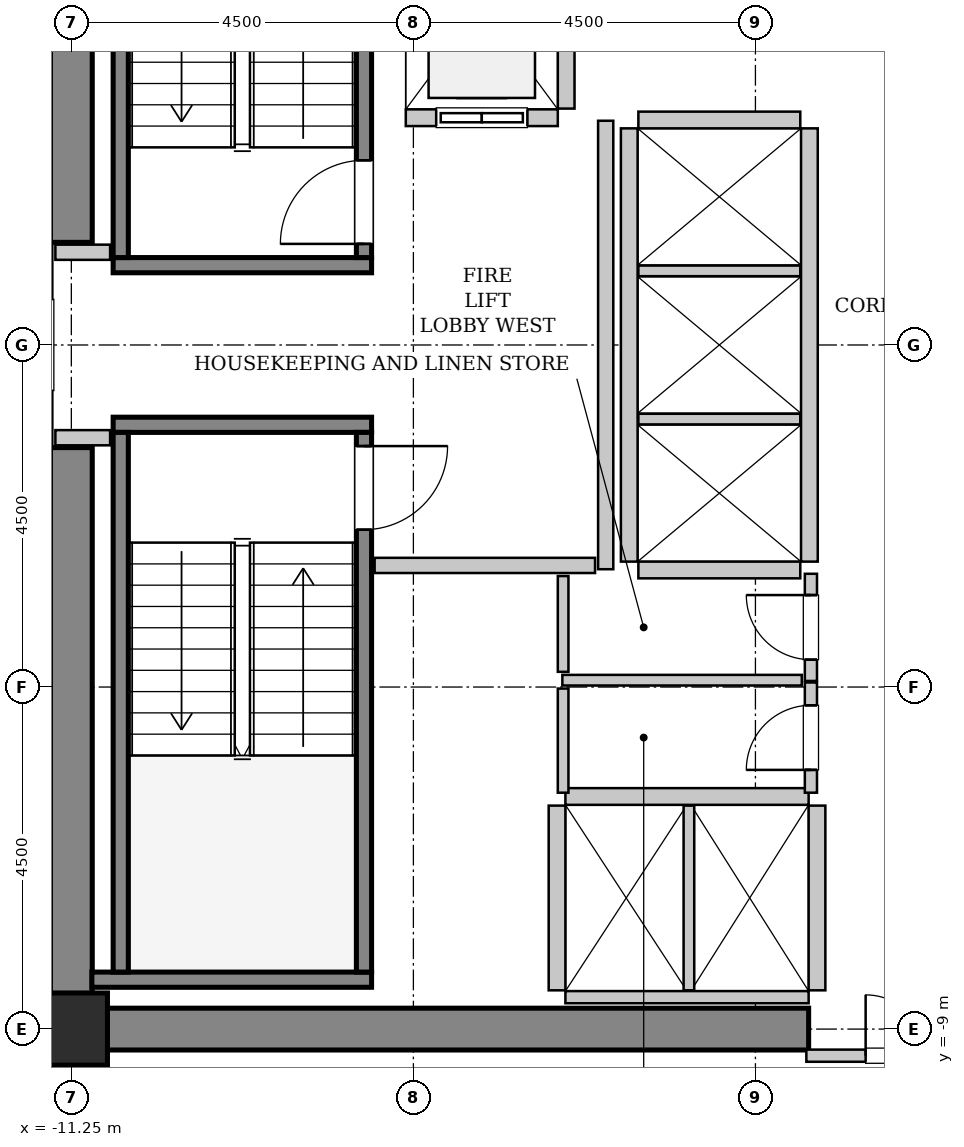
"""IFC4 building model, lengths in metres.
Left out: names, types, materials, properties, quantities, classifications, styles, units other than length and angle.
Written with IfcOpenShell. Run it as: python <this file> out.ifc"""

import sys

from ifc_helpers import new_model, si_unit, direction, frame, frame_2d, origin, origin_2d, place, context, subcontext, project, spatial, rectangle, hollow_rectangle, extrude, source, transform, mapped, element, fill, save


model = new_model("IFC4")
c1 = context("Model", 3, precision=1e-05, world=origin(), true_north=direction((0.0, 1.0)))
c2 = subcontext(c1, "Body", "Model", "MODEL_VIEW")
j1 = project(units=[si_unit("LENGTHUNIT", "METRE"), si_unit("PLANEANGLEUNIT", "RADIAN")], contexts=[c1])
p1 = place(None, origin())
s1 = spatial("IfcSite", under=j1, at=p1, CompositionType="ELEMENT")
p2 = place(p1, origin())
s2 = spatial("IfcBuilding", under=s1, at=p2, CompositionType="ELEMENT")
p3 = place(p2, frame((0.0, 0.0, 136.4)))
s3 = spatial("IfcBuildingStorey", under=s2, at=p3, CompositionType="ELEMENT", Elevation=136.4)
m1 = source(origin(), c2, "Body", "SweptSolid", [
    extrude(rectangle(XDim=9.975, YDim=0.55, at=frame_2d((4.987, 0.0))), origin(), (0.0, 0.0, 1.0), 3.8),
])
p4 = place(p3, frame((-11.525, -9.0, 0.0), z_axis=(0.0, 0.0, 1.0), x_axis=(1.0, 0.0, 0.0)))
e1 = element("IfcWall", 1, at=p4, inside=s3, PredefinedType="SHEAR", context=c2, shape_type="MappedRepresentation", body=[
    mapped(m1, transform((0.0, 0.0, 0.0), x_axis=(1.0, 0.0, 0.0), y_axis=(0.0, 1.0, 0.0), z_axis=(0.0, 0.0, 1.0), scale=1.0)),
])
m2 = source(origin(), c2, "Body", "SweptSolid", [
    extrude(rectangle(XDim=7.375, YDim=0.55, at=frame_2d((3.688, 0.0))), origin(), (0.0, 0.0, 1.0), 3.8),
])
for number, where, z_axis, x_axis in (
    (2, (-11.25, -8.725, 0.0), (0.0, 0.0, 1.0), (0.0, 1.0, 0.0)),
    (3, (-11.25, 1.35, 0.0), (0.0, 0.0, 1.0), (0.0, 1.0, 0.0)),
):
    element("IfcWall", number, at=place(p3, frame(where, z_axis=z_axis, x_axis=x_axis)), inside=s3, PredefinedType="SHEAR", context=c2, shape_type="MappedRepresentation", body=[
        mapped(m2, transform((0.0, 0.0, 0.0), x_axis=(1.0, 0.0, 0.0), y_axis=(0.0, 1.0, 0.0), z_axis=(0.0, 0.0, 1.0), scale=1.0)),
    ])
m3 = source(origin(), c2, "Body", "SweptSolid", [
    extrude(hollow_rectangle(XDim=0.95, YDim=0.95, WallThickness=0.045, InnerFilletRadius=0.045, OuterFilletRadius=0.09, at=origin_2d()), origin(), (0.0, 0.0, 1.0), 3.8),
])
p5 = place(p3, frame((-11.25, -9.0, 0.0), z_axis=(0.0, 0.0, 1.0), x_axis=(1.0, 0.0, 0.0)))
e4 = element("IfcColumn", 4, at=p5, inside=s3, PredefinedType="COLUMN", context=c2, shape_type="MappedRepresentation", body=[
    mapped(m3, transform((0.0, 0.0, 0.0), x_axis=(1.0, 0.0, 0.0), y_axis=(0.0, 1.0, 0.0), z_axis=(0.0, 0.0, 1.0), scale=1.0)),
])
m4 = source(origin(), c2, "Body", "SweptSolid", [
    extrude(rectangle(XDim=3.4, YDim=0.2, at=frame_2d((1.7, 0.0))), origin(), (0.0, 0.0, 1.0), 3.8),
])
p6 = place(p3, frame((-7.3, 1.05, 0.0), z_axis=(0.0, 0.0, 1.0), x_axis=(-1.0, 0.0, 0.0)))
e5 = element("IfcWall", 5, at=p6, inside=s3, PredefinedType="SOLIDWALL", context=c2, shape_type="MappedRepresentation", body=[
    mapped(m4, transform((0.0, 0.0, 0.0), x_axis=(1.0, 0.0, 0.0), y_axis=(0.0, 1.0, 0.0), z_axis=(0.0, 0.0, 1.0), scale=1.0)),
])
m5 = source(origin(), c2, "Body", "SweptSolid", [
    extrude(rectangle(XDim=7.1, YDim=0.2, at=frame_2d((3.55, 0.0))), origin(), (0.0, 0.0, 1.0), 3.8),
])
p7 = place(p3, frame((-7.4, 1.15, 0.0), z_axis=(0.0, 0.0, 1.0), x_axis=(0.0, 1.0, 0.0)))
e6 = element("IfcWall", 6, at=p7, inside=s3, PredefinedType="SOLIDWALL", context=c2, shape_type="MappedRepresentation", body=[
    mapped(m5, transform((0.0, 0.0, 0.0), x_axis=(1.0, 0.0, 0.0), y_axis=(0.0, 1.0, 0.0), z_axis=(0.0, 0.0, 1.0), scale=1.0)),
])
p8 = place(p7, frame((0.18, 0.0, 0.0)))
e7 = element("IfcOpeningElement", 7, at=p8, cuts=e6, PredefinedType="OPENING", context=c2, shape_type="SweptSolid", body=[
    extrude(rectangle(XDim=1.1, YDim=2.15, at=frame_2d((0.55, 1.075))), frame((0.0, 0.11, 0.0), z_axis=(0.0, -1.0, 0.0), x_axis=(1.0, 0.0, 0.0)), (0.0, 0.0, 1.0), 0.22),
])
p9 = place(p3, frame((-10.6, 1.15, 0.0), z_axis=(0.0, 0.0, 1.0), x_axis=(0.0, 1.0, 0.0)))
e8 = element("IfcWall", 8, at=p9, inside=s3, PredefinedType="SOLIDWALL", context=c2, shape_type="MappedRepresentation", body=[
    mapped(m5, transform((0.0, 0.0, 0.0), x_axis=(1.0, 0.0, 0.0), y_axis=(0.0, 1.0, 0.0), z_axis=(0.0, 0.0, 1.0), scale=1.0)),
])
p10 = place(p3, frame((-10.7, -1.05, 0.0), z_axis=(0.0, 0.0, 1.0), x_axis=(1.0, 0.0, 0.0)))
e9 = element("IfcWall", 9, at=p10, inside=s3, PredefinedType="SOLIDWALL", context=c2, shape_type="MappedRepresentation", body=[
    mapped(m4, transform((0.0, 0.0, 0.0), x_axis=(1.0, 0.0, 0.0), y_axis=(0.0, 1.0, 0.0), z_axis=(0.0, 0.0, 1.0), scale=1.0)),
])
m6 = source(origin(), c2, "Body", "SweptSolid", [
    extrude(rectangle(XDim=3.68, YDim=0.2, at=frame_2d((1.84, 0.0))), origin(), (0.0, 0.0, 1.0), 3.8),
])
p11 = place(p3, frame((-10.98, -8.35, 0.0), z_axis=(0.0, 0.0, 1.0), x_axis=(1.0, 0.0, 0.0)))
e10 = element("IfcWall", 10, at=p11, inside=s3, PredefinedType="SOLIDWALL", context=c2, shape_type="MappedRepresentation", body=[
    mapped(m6, transform((0.0, 0.0, 0.0), x_axis=(1.0, 0.0, 0.0), y_axis=(0.0, 1.0, 0.0), z_axis=(0.0, 0.0, 1.0), scale=1.0)),
])
p12 = place(p3, frame((-10.6, -1.15, 0.0), z_axis=(0.0, 0.0, 1.0), x_axis=(0.0, -1.0, 0.0)))
e11 = element("IfcWall", 11, at=p12, inside=s3, PredefinedType="SOLIDWALL", context=c2, shape_type="MappedRepresentation", body=[
    mapped(m5, transform((0.0, 0.0, 0.0), x_axis=(1.0, 0.0, 0.0), y_axis=(0.0, 1.0, 0.0), z_axis=(0.0, 0.0, 1.0), scale=1.0)),
])
p13 = place(p3, frame((-7.4, -1.15, 0.0), z_axis=(0.0, 0.0, 1.0), x_axis=(0.0, -1.0, 0.0)))
e12 = element("IfcWall", 12, at=p13, inside=s3, PredefinedType="SOLIDWALL", context=c2, shape_type="MappedRepresentation", body=[
    mapped(m5, transform((0.0, 0.0, 0.0), x_axis=(1.0, 0.0, 0.0), y_axis=(0.0, 1.0, 0.0), z_axis=(0.0, 0.0, 1.0), scale=1.0)),
])
p14 = place(p13, frame((0.18, 0.0, 0.0)))
e13 = element("IfcOpeningElement", 13, at=p14, cuts=e12, PredefinedType="OPENING", context=c2, shape_type="SweptSolid", body=[
    extrude(rectangle(XDim=1.1, YDim=2.15, at=frame_2d((0.55, 1.075))), frame((0.0, 0.11, 0.0), z_axis=(0.0, -1.0, 0.0), x_axis=(1.0, 0.0, 0.0)), (0.0, 0.0, 1.0), 0.22),
])
m7 = source(origin(), c2, "Body", "SweptSolid", [
    extrude(rectangle(XDim=2.0, YDim=0.22, at=frame_2d((1.0, 0.0))), origin(), (0.0, 0.0, 1.0), 3.535),
])
p15 = place(p3, frame((-6.85, 2.99, 0.0), z_axis=(0.0, 0.0, 1.0), x_axis=(1.0, 0.0, 0.0)))
e14 = element("IfcWall", 14, at=p15, inside=s3, PredefinedType="SOLIDWALL", context=c2, shape_type="MappedRepresentation", body=[
    mapped(m7, transform((0.0, 0.0, 0.0), x_axis=(1.0, 0.0, 0.0), y_axis=(0.0, 1.0, 0.0), z_axis=(0.0, 0.0, 1.0), scale=1.0)),
])
p16 = place(p15, frame((0.4, 0.0, 0.0)))
e15 = element("IfcOpeningElement", 15, at=p16, cuts=e14, PredefinedType="OPENING", context=c2, shape_type="SweptSolid", body=[
    extrude(rectangle(XDim=1.2, YDim=2.2, at=frame_2d((0.6, 1.1))), frame((0.0, 0.12, 0.0), z_axis=(0.0, -1.0, 0.0), x_axis=(1.0, 0.0, 0.0)), (0.0, 0.0, 1.0), 0.24),
])
m8 = source(origin(), c2, "Body", "SweptSolid", [
    extrude(rectangle(XDim=2.68, YDim=0.22, at=frame_2d((1.34, 0.0))), origin(), (0.0, 0.0, 1.0), 3.535),
])
p17 = place(p3, frame((-4.74, 3.11, 0.0), z_axis=(0.0, 0.0, 1.0), x_axis=(0.0, 1.0, 0.0)))
e16 = element("IfcWall", 16, at=p17, inside=s3, PredefinedType="SOLIDWALL", context=c2, shape_type="MappedRepresentation", body=[
    mapped(m8, transform((0.0, 0.0, 0.0), x_axis=(1.0, 0.0, 0.0), y_axis=(0.0, 1.0, 0.0), z_axis=(0.0, 0.0, 1.0), scale=1.0)),
])
m9 = source(origin(), c2, "Body", "SweptSolid", [
    extrude(rectangle(XDim=3.2, YDim=0.22, at=frame_2d((1.6, 0.0))), origin(), (0.0, 0.0, 1.0), 3.535),
])
p18 = place(p3, frame((-1.55, -5.94, 0.0), z_axis=(0.0, 0.0, 1.0), x_axis=(-1.0, 0.0, 0.0)))
e17 = element("IfcWall", 17, at=p18, inside=s3, PredefinedType="SOLIDWALL", context=c2, shape_type="MappedRepresentation", body=[
    mapped(m9, transform((0.0, 0.0, 0.0), x_axis=(1.0, 0.0, 0.0), y_axis=(0.0, 1.0, 0.0), z_axis=(0.0, 0.0, 1.0), scale=1.0)),
])
m10 = source(origin(), c2, "Body", "SweptSolid", [
    extrude(rectangle(XDim=3.2, YDim=0.16, at=frame_2d((1.6, 0.0))), origin(), (0.0, 0.0, 1.0), 2.425),
])
p19 = place(p3, frame((-4.75, -8.58, 0.0), z_axis=(0.0, 0.0, 1.0), x_axis=(1.0, 0.0, 0.0)))
e18 = element("IfcWall", 18, at=p19, inside=s3, PredefinedType="PARTITIONING", context=c2, shape_type="MappedRepresentation", body=[
    mapped(m10, transform((0.0, 0.0, 0.0), x_axis=(1.0, 0.0, 0.0), y_axis=(0.0, 1.0, 0.0), z_axis=(0.0, 0.0, 1.0), scale=1.0)),
])
m11 = source(origin(), c2, "Body", "SweptSolid", [
    extrude(rectangle(XDim=2.43, YDim=0.22, at=frame_2d((1.215, 0.0))), origin(), (0.0, 0.0, 1.0), 3.535),
])
p20 = place(p3, frame((-4.86, -6.06, 0.0), z_axis=(0.0, 0.0, 1.0), x_axis=(0.0, -1.0, 0.0)))
e19 = element("IfcWall", 19, at=p20, inside=s3, PredefinedType="SOLIDWALL", context=c2, shape_type="MappedRepresentation", body=[
    mapped(m11, transform((0.0, 0.0, 0.0), x_axis=(1.0, 0.0, 0.0), y_axis=(0.0, 1.0, 0.0), z_axis=(0.0, 0.0, 1.0), scale=1.0)),
])
m12 = source(origin(), c2, "Body", "SweptSolid", [
    extrude(rectangle(XDim=2.43, YDim=0.14, at=frame_2d((1.215, 0.0))), origin(), (0.0, 0.0, 1.0), 3.535),
])
p21 = place(p3, frame((-3.125, -8.49, 0.0), z_axis=(0.0, 0.0, 1.0), x_axis=(0.0, 1.0, 0.0)))
e20 = element("IfcWall", 20, at=p21, inside=s3, PredefinedType="PARTITIONING", context=c2, shape_type="MappedRepresentation", body=[
    mapped(m12, transform((0.0, 0.0, 0.0), x_axis=(1.0, 0.0, 0.0), y_axis=(0.0, 1.0, 0.0), z_axis=(0.0, 0.0, 1.0), scale=1.0)),
])
p22 = place(p3, frame((-1.44, -8.49, 0.0), z_axis=(0.0, 0.0, 1.0), x_axis=(0.0, 1.0, 0.0)))
e21 = element("IfcWall", 21, at=p22, inside=s3, PredefinedType="SOLIDWALL", context=c2, shape_type="MappedRepresentation", body=[
    mapped(m11, transform((0.0, 0.0, 0.0), x_axis=(1.0, 0.0, 0.0), y_axis=(0.0, 1.0, 0.0), z_axis=(0.0, 0.0, 1.0), scale=1.0)),
])
m13 = source(origin(), c2, "Body", "SweptSolid", [
    extrude(rectangle(XDim=5.7, YDim=0.22, at=frame_2d((2.85, 0.0))), origin(), (0.0, 0.0, 1.0), 3.535),
])
for number, where, z_axis, x_axis in (
    (22, (-1.54, -2.85, 0.0), (0.0, 0.0, 1.0), (0.0, 1.0, 0.0)),
    (23, (-3.91, 2.85, 0.0), (0.0, 0.0, 1.0), (0.0, -1.0, 0.0)),
):
    element("IfcWall", number, at=place(p3, frame(where, z_axis=z_axis, x_axis=x_axis)), inside=s3, PredefinedType="SOLIDWALL", context=c2, shape_type="MappedRepresentation", body=[
        mapped(m13, transform((0.0, 0.0, 0.0), x_axis=(1.0, 0.0, 0.0), y_axis=(0.0, 1.0, 0.0), z_axis=(0.0, 0.0, 1.0), scale=1.0)),
    ])
m14 = source(origin(), c2, "Body", "SweptSolid", [
    extrude(rectangle(XDim=2.13, YDim=0.22, at=frame_2d((1.065, 0.0))), origin(), (0.0, 0.0, 1.0), 3.535),
])
p23 = place(p3, frame((-3.79, -2.96, 0.0), z_axis=(0.0, 0.0, 1.0), x_axis=(1.0, 0.0, 0.0)))
e24 = element("IfcWall", 24, at=p23, inside=s3, PredefinedType="SOLIDWALL", context=c2, shape_type="MappedRepresentation", body=[
    mapped(m14, transform((0.0, 0.0, 0.0), x_axis=(1.0, 0.0, 0.0), y_axis=(0.0, 1.0, 0.0), z_axis=(0.0, 0.0, 1.0), scale=1.0)),
])
m15 = source(origin(), c2, "Body", "SweptSolid", [
    extrude(rectangle(XDim=2.13, YDim=0.14, at=frame_2d((1.065, 0.0))), origin(), (0.0, 0.0, 1.0), 3.535),
])
for number, where, z_axis, x_axis in (
    (25, (-3.79, -0.975, 0.0), (0.0, 0.0, 1.0), (1.0, 0.0, 0.0)),
    (26, (-3.79, 0.975, 0.0), (0.0, 0.0, 1.0), (1.0, 0.0, 0.0)),
):
    element("IfcWall", number, at=place(p3, frame(where, z_axis=z_axis, x_axis=x_axis)), inside=s3, PredefinedType="PARTITIONING", context=c2, shape_type="MappedRepresentation", body=[
        mapped(m15, transform((0.0, 0.0, 0.0), x_axis=(1.0, 0.0, 0.0), y_axis=(0.0, 1.0, 0.0), z_axis=(0.0, 0.0, 1.0), scale=1.0)),
    ])
p24 = place(p3, frame((-1.66, 2.96, 0.0), z_axis=(0.0, 0.0, 1.0), x_axis=(-1.0, 0.0, 0.0)))
e27 = element("IfcWall", 27, at=p24, inside=s3, PredefinedType="SOLIDWALL", context=c2, shape_type="MappedRepresentation", body=[
    mapped(m14, transform((0.0, 0.0, 0.0), x_axis=(1.0, 0.0, 0.0), y_axis=(0.0, 1.0, 0.0), z_axis=(0.0, 0.0, 1.0), scale=1.0)),
])
m16 = source(origin(), c2, "Body", "SweptSolid", [
    extrude(rectangle(XDim=5.9, YDim=0.2, at=frame_2d((2.95, 0.0))), origin(), (0.0, 0.0, 1.0), 3.535),
])
p25 = place(p3, frame((-4.22, -2.95, 0.0), z_axis=(0.0, 0.0, 1.0), x_axis=(0.0, 1.0, 0.0)))
e28 = element("IfcWall", 28, at=p25, inside=s3, PredefinedType="PARTITIONING", context=c2, shape_type="MappedRepresentation", body=[
    mapped(m16, transform((0.0, 0.0, 0.0), x_axis=(1.0, 0.0, 0.0), y_axis=(0.0, 1.0, 0.0), z_axis=(0.0, 0.0, 1.0), scale=1.0)),
])
m17 = source(origin(), c2, "Body", "SweptSolid", [
    extrude(rectangle(XDim=2.9, YDim=0.2, at=frame_2d((1.45, 0.0))), origin(), (0.0, 0.0, 1.0), 3.535),
])
p26 = place(p3, frame((-7.26, -2.9, 0.0), z_axis=(0.0, 0.0, 1.0), x_axis=(1.0, 0.0, 0.0)))
e29 = element("IfcWall", 29, at=p26, inside=s3, PredefinedType="PARTITIONING", context=c2, shape_type="MappedRepresentation", body=[
    mapped(m17, transform((0.0, 0.0, 0.0), x_axis=(1.0, 0.0, 0.0), y_axis=(0.0, 1.0, 0.0), z_axis=(0.0, 0.0, 1.0), scale=1.0)),
])
m18 = source(origin(), c2, "Body", "SweptSolid", [
    extrude(rectangle(XDim=0.72, YDim=0.2, at=frame_2d((0.36, 0.0))), origin(), (0.0, 0.0, 1.0), 3.535),
])
for number, where, z_axis, x_axis in (
    (30, (-11.46, 1.22, 0.0), (0.0, 0.0, 1.0), (1.0, 0.0, 0.0)),
    (31, (-11.46, -1.22, 0.0), (0.0, 0.0, 1.0), (1.0, 0.0, 0.0)),
):
    element("IfcWall", number, at=place(p3, frame(where, z_axis=z_axis, x_axis=x_axis)), inside=s3, PredefinedType="PARTITIONING", context=c2, shape_type="MappedRepresentation", body=[
        mapped(m18, transform((0.0, 0.0, 0.0), x_axis=(1.0, 0.0, 0.0), y_axis=(0.0, 1.0, 0.0), z_axis=(0.0, 0.0, 1.0), scale=1.0)),
    ])
m19 = source(origin(), c2, "Body", "SweptSolid", [
    extrude(rectangle(XDim=3.16, YDim=0.16, at=frame_2d((1.58, 0.0))), origin(), (0.0, 0.0, 1.0), 2.425),
])
p27 = place(p3, frame((-1.58, -9.35, 0.0), z_axis=(0.0, 0.0, 1.0), x_axis=(1.0, 0.0, 0.0)))
e32 = element("IfcWall", 32, at=p27, inside=s3, PredefinedType="PARTITIONING", context=c2, shape_type="MappedRepresentation", body=[
    mapped(m19, transform((0.0, 0.0, 0.0), x_axis=(1.0, 0.0, 0.0), y_axis=(0.0, 1.0, 0.0), z_axis=(0.0, 0.0, 1.0), scale=1.0)),
])
p28 = place(p27, frame((0.78, 0.0, 0.0)))
e33 = element("IfcOpeningElement", 33, at=p28, cuts=e32, PredefinedType="OPENING", context=c2, shape_type="SweptSolid", body=[
    extrude(rectangle(XDim=1.6, YDim=2.3, at=frame_2d((0.8, 1.15))), frame((0.0, 0.09, 0.0), z_axis=(0.0, -1.0, 0.0), x_axis=(1.0, 0.0, 0.0)), (0.0, 0.0, 1.0), 0.18),
])
m20 = source(origin(), c2, "Body", "SweptSolid", [
    extrude(rectangle(XDim=1.41, YDim=0.16, at=frame_2d((0.705, 0.0))), origin(), (0.0, 0.0, 1.0), 3.535),
])
p29 = place(p3, frame((-1.52, -4.42, 0.0), z_axis=(0.0, 0.0, 1.0), x_axis=(0.0, 1.0, 0.0)))
e34 = element("IfcWall", 34, at=p29, inside=s3, PredefinedType="PARTITIONING", context=c2, shape_type="MappedRepresentation", body=[
    mapped(m20, transform((0.0, 0.0, 0.0), x_axis=(1.0, 0.0, 0.0), y_axis=(0.0, 1.0, 0.0), z_axis=(0.0, 0.0, 1.0), scale=1.0)),
])
p30 = place(p29, frame((0.28, 0.0, 0.0)))
e35 = element("IfcOpeningElement", 35, at=p30, cuts=e34, PredefinedType="OPENING", context=c2, shape_type="SweptSolid", body=[
    extrude(rectangle(XDim=0.85, YDim=2.1, at=frame_2d((0.425, 1.05))), frame((0.0, 0.09, 0.0), z_axis=(0.0, -1.0, 0.0), x_axis=(1.0, 0.0, 0.0)), (0.0, 0.0, 1.0), 0.18),
])
m21 = source(origin(), c2, "Body", "SweptSolid", [
    extrude(rectangle(XDim=3.15, YDim=0.14, at=frame_2d((1.575, 0.0))), origin(), (0.0, 0.0, 1.0), 3.535),
])
p31 = place(p3, frame((-4.79, -4.41, 0.0), z_axis=(0.0, 0.0, 1.0), x_axis=(1.0, 0.0, 0.0)))
e36 = element("IfcWall", 36, at=p31, inside=s3, PredefinedType="PARTITIONING", context=c2, shape_type="MappedRepresentation", body=[
    mapped(m21, transform((0.0, 0.0, 0.0), x_axis=(1.0, 0.0, 0.0), y_axis=(0.0, 1.0, 0.0), z_axis=(0.0, 0.0, 1.0), scale=1.0)),
])
m22 = source(origin(), c2, "Body", "SweptSolid", [
    extrude(rectangle(XDim=1.26, YDim=0.14, at=frame_2d((0.63, 0.0))), origin(), (0.0, 0.0, 1.0), 3.535),
])
p32 = place(p3, frame((-4.78, -4.3, 0.0), z_axis=(0.0, 0.0, 1.0), x_axis=(0.0, 1.0, 0.0)))
e37 = element("IfcWall", 37, at=p32, inside=s3, PredefinedType="PARTITIONING", context=c2, shape_type="MappedRepresentation", body=[
    mapped(m22, transform((0.0, 0.0, 0.0), x_axis=(1.0, 0.0, 0.0), y_axis=(0.0, 1.0, 0.0), z_axis=(0.0, 0.0, 1.0), scale=1.0)),
])
m23 = source(origin(), c2, "Body", "SweptSolid", [
    extrude(rectangle(XDim=1.45, YDim=0.16, at=frame_2d((0.725, 0.0))), origin(), (0.0, 0.0, 1.0), 3.535),
])
p33 = place(p3, frame((-1.52, -5.89, 0.0), z_axis=(0.0, 0.0, 1.0), x_axis=(0.0, 1.0, 0.0)))
e38 = element("IfcWall", 38, at=p33, inside=s3, PredefinedType="PARTITIONING", context=c2, shape_type="MappedRepresentation", body=[
    mapped(m23, transform((0.0, 0.0, 0.0), x_axis=(1.0, 0.0, 0.0), y_axis=(0.0, 1.0, 0.0), z_axis=(0.0, 0.0, 1.0), scale=1.0)),
])
p34 = place(p33, frame((0.3, 0.0, 0.0)))
e39 = element("IfcOpeningElement", 39, at=p34, cuts=e38, PredefinedType="OPENING", context=c2, shape_type="SweptSolid", body=[
    extrude(rectangle(XDim=0.85, YDim=2.1, at=frame_2d((0.425, 1.05))), frame((0.0, 0.09, 0.0), z_axis=(0.0, -1.0, 0.0), x_axis=(1.0, 0.0, 0.0)), (0.0, 0.0, 1.0), 0.18),
])
m24 = source(origin(), c2, "Body", "SweptSolid", [
    extrude(rectangle(XDim=1.37, YDim=0.14, at=frame_2d((0.685, 0.0))), origin(), (0.0, 0.0, 1.0), 3.535),
])
p35 = place(p3, frame((-4.78, -5.89, 0.0), z_axis=(0.0, 0.0, 1.0), x_axis=(0.0, 1.0, 0.0)))
e40 = element("IfcWall", 40, at=p35, inside=s3, PredefinedType="PARTITIONING", context=c2, shape_type="MappedRepresentation", body=[
    mapped(m24, transform((0.0, 0.0, 0.0), x_axis=(1.0, 0.0, 0.0), y_axis=(0.0, 1.0, 0.0), z_axis=(0.0, 0.0, 1.0), scale=1.0)),
])
m25 = source(origin(), c2, "Body", "SweptSolid", [
    extrude(rectangle(XDim=1.1, YDim=2.15, at=frame_2d((0.55, 1.075))), frame((0.0, 0.025, 0.0), z_axis=(0.0, -1.0, 0.0), x_axis=(1.0, 0.0, 0.0)), (0.0, 0.0, 1.0), 0.05),
])
p36 = place(p8, origin())
e41 = element("IfcDoor", 41, at=p36, inside=s3, OperationType="SINGLE_SWING_LEFT", PredefinedType="DOOR", context=c2, shape_type="MappedRepresentation", body=[
    mapped(m25, transform((0.0, 0.0, 0.0), x_axis=(1.0, 0.0, 0.0), y_axis=(0.0, 1.0, 0.0), z_axis=(0.0, 0.0, 1.0), scale=1.0)),
])
fill(e7, e41)
p37 = place(p14, origin())
e42 = element("IfcDoor", 42, at=p37, inside=s3, OperationType="SINGLE_SWING_LEFT", PredefinedType="DOOR", context=c2, shape_type="MappedRepresentation", body=[
    mapped(m25, transform((0.0, 0.0, 0.0), x_axis=(1.0, 0.0, 0.0), y_axis=(0.0, 1.0, 0.0), z_axis=(0.0, 0.0, 1.0), scale=1.0)),
])
fill(e13, e42)
m26 = source(origin(), c2, "Body", "SweptSolid", [
    extrude(rectangle(XDim=1.2, YDim=2.2, at=frame_2d((0.6, 1.1))), frame((0.0, 0.025, 0.0), z_axis=(0.0, -1.0, 0.0), x_axis=(1.0, 0.0, 0.0)), (0.0, 0.0, 1.0), 0.05),
])
p38 = place(p16, origin())
e43 = element("IfcDoor", 43, at=p38, inside=s3, OperationType="SLIDING_TO_LEFT", PredefinedType="DOOR", context=c2, shape_type="MappedRepresentation", body=[
    mapped(m26, transform((0.0, 0.0, 0.0), x_axis=(1.0, 0.0, 0.0), y_axis=(0.0, 1.0, 0.0), z_axis=(0.0, 0.0, 1.0), scale=1.0)),
])
fill(e15, e43)
m27 = source(origin(), c2, "Body", "SweptSolid", [
    extrude(rectangle(XDim=1.6, YDim=2.3, at=frame_2d((0.8, 1.15))), frame((0.0, 0.025, 0.0), z_axis=(0.0, -1.0, 0.0), x_axis=(1.0, 0.0, 0.0)), (0.0, 0.0, 1.0), 0.05),
])
p39 = place(p28, origin())
e44 = element("IfcDoor", 44, at=p39, inside=s3, OperationType="DOUBLE_DOOR_SINGLE_SWING", PredefinedType="DOOR", context=c2, shape_type="MappedRepresentation", body=[
    mapped(m27, transform((0.0, 0.0, 0.0), x_axis=(1.0, 0.0, 0.0), y_axis=(0.0, 1.0, 0.0), z_axis=(0.0, 0.0, 1.0), scale=1.0)),
])
fill(e33, e44)
m28 = source(origin(), c2, "Body", "SweptSolid", [
    extrude(rectangle(XDim=0.85, YDim=2.1, at=frame_2d((0.425, 1.05))), frame((0.0, 0.025, 0.0), z_axis=(0.0, -1.0, 0.0), x_axis=(1.0, 0.0, 0.0)), (0.0, 0.0, 1.0), 0.05),
])
p40 = place(p30, origin())
e45 = element("IfcDoor", 45, at=p40, inside=s3, OperationType="SINGLE_SWING_RIGHT", PredefinedType="DOOR", context=c2, shape_type="MappedRepresentation", body=[
    mapped(m28, transform((0.0, 0.0, 0.0), x_axis=(1.0, 0.0, 0.0), y_axis=(0.0, 1.0, 0.0), z_axis=(0.0, 0.0, 1.0), scale=1.0)),
])
fill(e35, e45)
p41 = place(p34, origin())
e46 = element("IfcDoor", 46, at=p41, inside=s3, OperationType="SINGLE_SWING_LEFT", PredefinedType="DOOR", context=c2, shape_type="MappedRepresentation", body=[
    mapped(m28, transform((0.0, 0.0, 0.0), x_axis=(1.0, 0.0, 0.0), y_axis=(0.0, 1.0, 0.0), z_axis=(0.0, 0.0, 1.0), scale=1.0)),
])
fill(e39, e46)
save(model, sys.argv[1])
